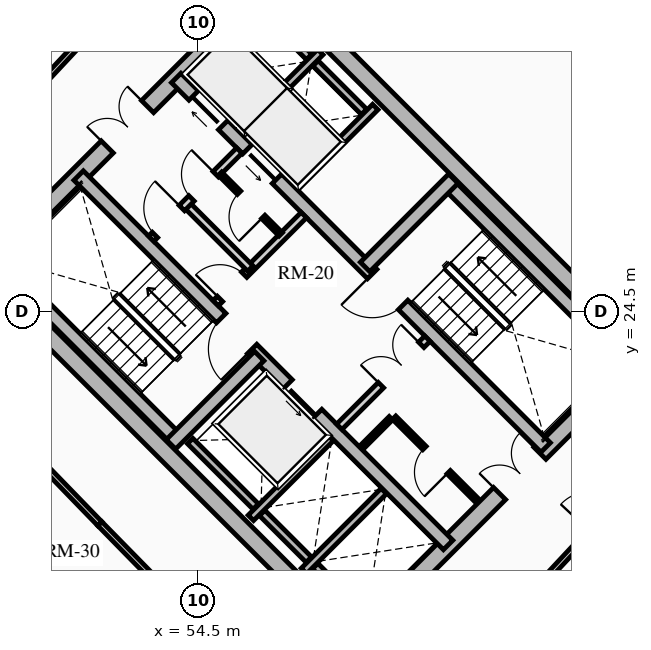
"""IFC4 building model, lengths in metres.
Left out: names, types, materials, properties, quantities, classifications, styles, units other than length and angle.
Written with IfcOpenShell. Run it as: python <this file> out.ifc"""

import sys

from ifc_helpers import new_model, si_unit, direction, frame, frame_2d, origin, place, context, subcontext, project, spatial, rectangle, extrude, source, transform, mapped, element, fill, save


model = new_model("IFC4")
c1 = context("Model", 3, precision=1e-05, world=origin(), true_north=direction((0.0, 1.0)))
c2 = subcontext(c1, "Body", "Model", "MODEL_VIEW")
j1 = project(units=[si_unit("LENGTHUNIT", "METRE"), si_unit("PLANEANGLEUNIT", "RADIAN")], contexts=[c1])
p1 = place(None, origin())
s1 = spatial("IfcSite", under=j1, at=p1, CompositionType="ELEMENT")
p2 = place(p1, origin())
s2 = spatial("IfcBuilding", under=s1, at=p2, CompositionType="ELEMENT")
p3 = place(p2, frame((0.0, 0.0, 105.07)))
s3 = spatial("IfcBuildingStorey", under=s2, at=p3, CompositionType="ELEMENT", Elevation=105.07)
for number, where, z_axis, x_axis in (
    (1, (58.737, 15.697, 0.0), (0.0, 0.0, 1.0), (-0.707, 0.707, 0.0)),
    (2, (66.303, 23.263, 0.0), (0.0, 0.0, 1.0), (-0.707, 0.707, 0.0)),
):
    element("IfcWall", number, at=place(p3, frame(where, z_axis=z_axis, x_axis=x_axis)), inside=s3, PredefinedType="SHEAR", context=c2, shape_type="SweptSolid", body=[
        extrude(rectangle(XDim=14.2, YDim=0.45, at=frame_2d((7.1, 0.0))), origin(), (0.0, 0.0, 1.0), 2.91),
    ])
p4 = place(p3, frame((58.578, 15.856, 0.0), z_axis=(0.0, 0.0, 1.0), x_axis=(0.707106781187, 0.707106781187, 0.0)))
e3 = element("IfcWall", 3, at=p4, inside=s3, PredefinedType="SHEAR", context=c2, shape_type="SweptSolid", body=[
    extrude(rectangle(XDim=10.7, YDim=0.45, at=frame_2d((5.35, 0.0))), origin(), (0.0, 0.0, 1.0), 2.91),
])
m1 = source(origin(), c2, "Body", "SweptSolid", [
    extrude(rectangle(XDim=1.5, YDim=2.02, at=frame_2d((0.75, 1.01))), frame((0.0, 0.235, 0.0), z_axis=(0.0, -1.0, 0.0), x_axis=(1.0, 0.0, 0.0)), (0.0, 0.0, 1.0), 0.47),
])
p5 = place(p4, frame((5.45, 0.0, 0.0)))
e4 = element("IfcOpeningElement", 4, at=p5, cuts=e3, PredefinedType="OPENING", context=c2, shape_type="MappedRepresentation", body=[
    mapped(m1, transform((0.0, 0.0, 0.0), x_axis=(1.0, 0.0, 0.0), y_axis=(0.0, 1.0, 0.0), z_axis=(0.0, 0.0, 1.0), scale=1.0)),
])
p6 = place(p3, frame((48.856, 25.578, 0.0), z_axis=(0.0, 0.0, 1.0), x_axis=(0.707106781187, 0.707106781187, 0.0)))
e5 = element("IfcWall", 5, at=p6, inside=s3, PredefinedType="SHEAR", context=c2, shape_type="SweptSolid", body=[
    extrude(rectangle(XDim=10.7, YDim=0.45, at=frame_2d((5.35, 0.0))), origin(), (0.0, 0.0, 1.0), 2.91),
])
p7 = place(p6, frame((4.6, 0.0, 0.0)))
e6 = element("IfcOpeningElement", 6, at=p7, cuts=e5, PredefinedType="OPENING", context=c2, shape_type="MappedRepresentation", body=[
    mapped(m1, transform((0.0, 0.0, 0.0), x_axis=(1.0, 0.0, 0.0), y_axis=(0.0, 1.0, 0.0), z_axis=(0.0, 0.0, 1.0), scale=1.0)),
])
p8 = place(p3, frame((61.078, 18.355, 0.0), z_axis=(0.0, 0.0, 1.0), x_axis=(-0.707106781187, 0.707106781187, 0.0)))
e7 = element("IfcWall", 7, at=p8, inside=s3, PredefinedType="SHEAR", context=c2, shape_type="SweptSolid", body=[
    extrude(rectangle(XDim=13.75, YDim=0.35, at=frame_2d((6.875, 0.0))), origin(), (0.0, 0.0, 1.0), 2.91),
])
m2 = source(origin(), c2, "Body", "SweptSolid", [
    extrude(rectangle(XDim=1.1, YDim=2.015, at=frame_2d((0.55, 1.007))), frame((0.0, 0.185, 0.0), z_axis=(0.0, -1.0, 0.0), x_axis=(1.0, 0.0, 0.0)), (0.0, 0.0, 1.0), 0.37),
])
p9 = place(p8, frame((4.875, 0.0, 0.0)))
e8 = element("IfcOpeningElement", 8, at=p9, cuts=e7, PredefinedType="OPENING", context=c2, shape_type="MappedRepresentation", body=[
    mapped(m2, transform((0.0, 0.0, 0.0), x_axis=(1.0, 0.0, 0.0), y_axis=(0.0, 1.0, 0.0), z_axis=(0.0, 0.0, 1.0), scale=1.0)),
])
m3 = source(origin(), c2, "Body", "SweptSolid", [
    extrude(rectangle(XDim=1.15, YDim=2.02, at=frame_2d((0.575, 1.01))), frame((0.0, 0.185, 0.0), z_axis=(0.0, -1.0, 0.0), x_axis=(1.0, 0.0, 0.0)), (0.0, 0.0, 1.0), 0.37),
])
p10 = place(p8, frame((7.295, 0.0, 0.0)))
e9 = element("IfcOpeningElement", 9, at=p10, cuts=e7, PredefinedType="OPENING", context=c2, shape_type="MappedRepresentation", body=[
    mapped(m3, transform((0.0, 0.0, 0.0), x_axis=(1.0, 0.0, 0.0), y_axis=(0.0, 1.0, 0.0), z_axis=(0.0, 0.0, 1.0), scale=1.0)),
])
p11 = place(p3, frame((63.645, 20.922, 0.0), z_axis=(0.0, 0.0, 1.0), x_axis=(-0.707106781187, 0.707106781187, 0.0)))
e10 = element("IfcWall", 10, at=p11, inside=s3, PredefinedType="SHEAR", context=c2, shape_type="SweptSolid", body=[
    extrude(rectangle(XDim=13.75, YDim=0.35, at=frame_2d((6.875, 0.0))), origin(), (0.0, 0.0, 1.0), 2.91),
])
p12 = place(p11, frame((10.0, 0.0, 0.0)))
e11 = element("IfcOpeningElement", 11, at=p12, cuts=e10, PredefinedType="OPENING", context=c2, shape_type="MappedRepresentation", body=[
    mapped(m2, transform((0.0, 0.0, 0.0), x_axis=(1.0, 0.0, 0.0), y_axis=(0.0, 1.0, 0.0), z_axis=(0.0, 0.0, 1.0), scale=1.0)),
])
p13 = place(p11, frame((12.0, 0.0, 0.0)))
e12 = element("IfcOpeningElement", 12, at=p13, cuts=e10, PredefinedType="OPENING", context=c2, shape_type="MappedRepresentation", body=[
    mapped(m2, transform((0.0, 0.0, 0.0), x_axis=(1.0, 0.0, 0.0), y_axis=(0.0, 1.0, 0.0), z_axis=(0.0, 0.0, 1.0), scale=1.0)),
])
p14 = place(p11, frame((5.305, 0.0, 0.0)))
e13 = element("IfcOpeningElement", 13, at=p14, cuts=e10, PredefinedType="OPENING", context=c2, shape_type="MappedRepresentation", body=[
    mapped(m3, transform((0.0, 0.0, 0.0), x_axis=(1.0, 0.0, 0.0), y_axis=(0.0, 1.0, 0.0), z_axis=(0.0, 0.0, 1.0), scale=1.0)),
])
p15 = place(p3, frame((53.922, 21.141, 0.0), z_axis=(0.0, 0.0, 1.0), x_axis=(-0.707088616009, 0.707124945897, 0.0)))
e14 = element("IfcWall", 14, at=p15, inside=s3, PredefinedType="SHEAR", context=c2, shape_type="SweptSolid", body=[
    extrude(rectangle(XDim=6.72, YDim=0.35, at=frame_2d((3.36, 0.0))), origin(), (0.0, 0.0, 1.0), 2.91),
])
p16 = place(p3, frame((53.784, 21.003, 0.0), z_axis=(0.0, 0.0, 1.0), x_axis=(0.707106781187, 0.707106781187, 0.0)))
e15 = element("IfcWall", 15, at=p16, inside=s3, PredefinedType="SHEAR", context=c2, shape_type="SweptSolid", body=[
    extrude(rectangle(XDim=3.285, YDim=0.35, at=frame_2d((1.643, 0.0))), origin(), (0.0, 0.0, 1.0), 2.91),
])
p17 = place(p3, frame((65.83, 23.107, 0.0), z_axis=(0.0, 0.0, 1.0), x_axis=(-0.707088616009, 0.707124945897, 0.0)))
e16 = element("IfcWall", 16, at=p17, inside=s3, PredefinedType="SHEAR", context=c2, shape_type="SweptSolid", body=[
    extrude(rectangle(XDim=6.72, YDim=0.35, at=frame_2d((3.36, 0.0))), origin(), (0.0, 0.0, 1.0), 2.91),
])
p18 = place(p3, frame((58.893, 25.674, 0.0), z_axis=(0.0, 0.0, 1.0), x_axis=(0.707106781187, 0.707106781187, 0.0)))
e17 = element("IfcWall", 17, at=p18, inside=s3, PredefinedType="SHEAR", context=c2, shape_type="SweptSolid", body=[
    extrude(rectangle(XDim=3.285, YDim=0.35, at=frame_2d((1.643, 0.0))), origin(), (0.0, 0.0, 1.0), 2.91),
])
p19 = place(p3, frame((55.888, 19.069, 0.0), z_axis=(0.0, 0.0, 1.0), x_axis=(0.707106781187, 0.707106781187, 0.0)))
e18 = element("IfcWall", 18, at=p19, inside=s3, PredefinedType="SHEAR", context=c2, shape_type="SweptSolid", body=[
    extrude(rectangle(XDim=2.97, YDim=0.2, at=frame_2d((1.485, 0.0))), origin(), (0.0, 0.0, 1.0), 2.91),
])
p20 = place(p3, frame((56.015, 19.366, 0.0), z_axis=(0.0, 0.0, 1.0), x_axis=(-0.707106781187, 0.707106781187, 0.0)))
e19 = element("IfcWall", 19, at=p20, inside=s3, PredefinedType="SHEAR", context=c2, shape_type="SweptSolid", body=[
    extrude(rectangle(XDim=2.44, YDim=0.2, at=frame_2d((1.22, 0.0))), origin(), (0.0, 0.0, 1.0), 2.91),
])
p21 = place(p3, frame((57.284, 17.673, 0.0), z_axis=(0.0, 0.0, 1.0), x_axis=(0.707147878904, 0.70706568108, 0.0)))
e20 = element("IfcWall", 20, at=p21, inside=s3, PredefinedType="SHEAR", context=c2, shape_type="SweptSolid", body=[
    extrude(rectangle(XDim=2.97, YDim=0.2, at=frame_2d((1.485, 0.0))), origin(), (0.0, 0.0, 1.0), 2.91),
])
p22 = place(p3, frame((57.412, 17.97, 0.0), z_axis=(0.0, 0.0, 1.0), x_axis=(-0.707106781187, 0.707106781187, 0.0)))
e21 = element("IfcWall", 21, at=p22, inside=s3, PredefinedType="SHEAR", context=c2, shape_type="SweptSolid", body=[
    extrude(rectangle(XDim=1.735, YDim=0.2, at=frame_2d((0.867, 0.0))), origin(), (0.0, 0.0, 1.0), 2.91),
])
p23 = place(p3, frame((58.737, 16.644, 0.0), z_axis=(0.0, 0.0, 1.0), x_axis=(-0.707032117043, 0.707181437447, 0.0)))
e22 = element("IfcWall", 22, at=p23, inside=s3, PredefinedType="SHEAR", context=c2, shape_type="SweptSolid", body=[
    extrude(rectangle(XDim=1.635, YDim=0.2, at=frame_2d((0.817, 0.0))), origin(), (0.0, 0.0, 1.0), 2.91),
])
p24 = place(p3, frame((57.062, 27.781, 0.0), z_axis=(0.0, 0.0, 1.0), x_axis=(0.707106781187, 0.707106781187, 0.0)))
e23 = element("IfcWall", 23, at=p24, inside=s3, PredefinedType="SHEAR", context=c2, shape_type="SweptSolid", body=[
    extrude(rectangle(XDim=2.97, YDim=0.2, at=frame_2d((1.485, 0.0))), origin(), (0.0, 0.0, 1.0), 2.91),
])
p25 = place(p3, frame((55.615, 29.227, 0.0), z_axis=(0.0, 0.0, 1.0), x_axis=(0.707147878904, 0.70706568108, 0.0)))
e24 = element("IfcWall", 24, at=p25, inside=s3, PredefinedType="SHEAR", context=c2, shape_type="SweptSolid", body=[
    extrude(rectangle(XDim=2.97, YDim=0.2, at=frame_2d((1.485, 0.0))), origin(), (0.0, 0.0, 1.0), 2.91),
])
p26 = place(p3, frame((58.865, 29.754, 0.0), z_axis=(0.0, 0.0, 1.0), x_axis=(-0.707174411312, 0.707039144592, 0.0)))
e25 = element("IfcWall", 25, at=p26, inside=s3, PredefinedType="SHEAR", context=c2, shape_type="SweptSolid", body=[
    extrude(rectangle(XDim=1.805, YDim=0.2, at=frame_2d((0.902, 0.0))), origin(), (0.0, 0.0, 1.0), 2.91),
])
p27 = place(p3, frame((57.419, 31.2, 0.0), z_axis=(0.0, 0.0, 1.0), x_axis=(-0.707032117043, 0.707181437447, 0.0)))
e26 = element("IfcWall", 26, at=p27, inside=s3, PredefinedType="SHEAR", context=c2, shape_type="SweptSolid", body=[
    extrude(rectangle(XDim=1.635, YDim=0.2, at=frame_2d((0.817, 0.0))), origin(), (0.0, 0.0, 1.0), 2.91),
])
p28 = place(p3, frame((58.214, 21.467, 0.0), z_axis=(0.0, 0.0, 1.0), x_axis=(0.707106781187, 0.707106781187, 0.0)))
e27 = element("IfcWall", 27, at=p28, inside=s3, PredefinedType="PARTITIONING", context=c2, shape_type="SweptSolid", body=[
    extrude(rectangle(XDim=3.28, YDim=0.2, at=frame_2d((1.64, 0.0))), origin(), (0.0, 0.0, 1.0), 2.655),
])
m4 = source(origin(), c2, "Body", "SweptSolid", [
    extrude(rectangle(XDim=1.5, YDim=2.02, at=frame_2d((0.75, 1.01))), frame((0.0, 0.11, 0.0), z_axis=(0.0, -1.0, 0.0), x_axis=(1.0, 0.0, 0.0)), (0.0, 0.0, 1.0), 0.22),
])
p29 = place(p28, frame((1.55, 0.0, 0.0)))
e28 = element("IfcOpeningElement", 28, at=p29, cuts=e27, PredefinedType="OPENING", context=c2, shape_type="MappedRepresentation", body=[
    mapped(m4, transform((0.0, 0.0, 0.0), x_axis=(1.0, 0.0, 0.0), y_axis=(0.0, 1.0, 0.0), z_axis=(0.0, 0.0, 1.0), scale=1.0)),
])
p30 = place(p3, frame((54.961, 24.719, 0.0), z_axis=(0.0, 0.0, 1.0), x_axis=(0.707106781187, 0.707106781187, 0.0)))
e29 = element("IfcWall", 29, at=p30, inside=s3, PredefinedType="PARTITIONING", context=c2, shape_type="SweptSolid", body=[
    extrude(rectangle(XDim=3.28, YDim=0.2, at=frame_2d((1.64, 0.0))), origin(), (0.0, 0.0, 1.0), 2.655),
])
m5 = source(origin(), c2, "Body", "SweptSolid", [
    extrude(rectangle(XDim=0.9, YDim=2.005, at=frame_2d((0.45, 1.002))), frame((0.0, 0.11, 0.0), z_axis=(0.0, -1.0, 0.0), x_axis=(1.0, 0.0, 0.0)), (0.0, 0.0, 1.0), 0.22),
])
p31 = place(p30, frame((0.16, 0.0, 0.0)))
e30 = element("IfcOpeningElement", 30, at=p31, cuts=e29, PredefinedType="OPENING", context=c2, shape_type="MappedRepresentation", body=[
    mapped(m5, transform((0.0, 0.0, 0.0), x_axis=(1.0, 0.0, 0.0), y_axis=(0.0, 1.0, 0.0), z_axis=(0.0, 0.0, 1.0), scale=1.0)),
])
p32 = place(p3, frame((55.874, 25.631, 0.0), z_axis=(0.0, 0.0, 1.0), x_axis=(-0.707157639372, 0.707055919343, 0.0)))
e31 = element("IfcWall", 31, at=p32, inside=s3, PredefinedType="PARTITIONING", context=c2, shape_type="SweptSolid", body=[
    extrude(rectangle(XDim=2.4, YDim=0.2, at=frame_2d((1.2, 0.0))), origin(), (0.0, 0.0, 1.0), 2.655),
])
p33 = place(p3, frame((53.264, 26.416, 0.0), z_axis=(0.0, 0.0, 1.0), x_axis=(0.707106781187, 0.707106781187, 0.0)))
e32 = element("IfcWall", 32, at=p33, inside=s3, PredefinedType="PARTITIONING", context=c2, shape_type="SweptSolid", body=[
    extrude(rectangle(XDim=3.28, YDim=0.2, at=frame_2d((1.64, 0.0))), origin(), (0.0, 0.0, 1.0), 2.655),
])
m6 = source(origin(), c2, "Body", "SweptSolid", [
    extrude(rectangle(XDim=1.0, YDim=2.015, at=frame_2d((0.5, 1.007))), frame((0.0, 0.11, 0.0), z_axis=(0.0, -1.0, 0.0), x_axis=(1.0, 0.0, 0.0)), (0.0, 0.0, 1.0), 0.22),
])
p34 = place(p33, frame((0.14, 0.0, 0.0)))
e33 = element("IfcOpeningElement", 33, at=p34, cuts=e32, PredefinedType="OPENING", context=c2, shape_type="MappedRepresentation", body=[
    mapped(m6, transform((0.0, 0.0, 0.0), x_axis=(1.0, 0.0, 0.0), y_axis=(0.0, 1.0, 0.0), z_axis=(0.0, 0.0, 1.0), scale=1.0)),
])
p35 = place(p33, frame((1.5, 0.0, 0.0)))
e34 = element("IfcOpeningElement", 34, at=p35, cuts=e32, PredefinedType="OPENING", context=c2, shape_type="MappedRepresentation", body=[
    mapped(m5, transform((0.0, 0.0, 0.0), x_axis=(1.0, 0.0, 0.0), y_axis=(0.0, 1.0, 0.0), z_axis=(0.0, 0.0, 1.0), scale=1.0)),
])
p36 = place(p3, frame((61.835, 19.529, 0.0), z_axis=(0.0, 0.0, 1.0), x_axis=(-0.707146413884, 0.707067146267, 0.0)))
e35 = element("IfcWall", 35, at=p36, inside=s3, PredefinedType="PARTITIONING", context=c2, shape_type="SweptSolid", body=[
    extrude(rectangle(XDim=3.08, YDim=0.125, at=frame_2d((1.54, 0.0))), origin(), (0.0, 0.0, 1.0), 2.655),
])
m7 = source(origin(), c2, "Body", "SweptSolid", [
    extrude(rectangle(XDim=0.9, YDim=2.005, at=frame_2d((0.45, 1.002))), frame((0.0, 0.073, 0.0), z_axis=(0.0, -1.0, 0.0), x_axis=(1.0, 0.0, 0.0)), (0.0, 0.0, 1.0), 0.145),
])
p37 = place(p36, frame((1.05, 0.0, 0.0)))
e36 = element("IfcOpeningElement", 36, at=p37, cuts=e35, PredefinedType="OPENING", context=c2, shape_type="MappedRepresentation", body=[
    mapped(m7, transform((0.0, 0.0, 0.0), x_axis=(1.0, 0.0, 0.0), y_axis=(0.0, 1.0, 0.0), z_axis=(0.0, 0.0, 1.0), scale=1.0)),
])
p38 = place(p3, frame((58.794, 20.915, 0.0), z_axis=(0.0, 0.0, 1.0), x_axis=(0.707106781187, 0.707106781187, 0.0)))
e37 = element("IfcWall", 37, at=p38, inside=s3, PredefinedType="PARTITIONING", context=c2, shape_type="SweptSolid", body=[
    extrude(rectangle(XDim=1.1, YDim=0.125, at=frame_2d((0.55, 0.0))), origin(), (0.0, 0.0, 1.0), 2.655),
])
p39 = place(p3, frame((56.673, 26.529, 0.0), z_axis=(0.0, 0.0, 1.0), x_axis=(-0.707052764397, 0.70716079385, 0.0)))
e38 = element("IfcWall", 38, at=p39, inside=s3, PredefinedType="PARTITIONING", context=c2, shape_type="SweptSolid", body=[
    extrude(rectangle(XDim=2.26, YDim=0.125, at=frame_2d((1.13, 0.0))), origin(), (0.0, 0.0, 1.0), 2.655),
])
p40 = place(p39, frame((0.65, 0.0, 0.0)))
e39 = element("IfcOpeningElement", 39, at=p40, cuts=e38, PredefinedType="OPENING", context=c2, shape_type="MappedRepresentation", body=[
    mapped(m7, transform((0.0, 0.0, 0.0), x_axis=(1.0, 0.0, 0.0), y_axis=(0.0, 1.0, 0.0), z_axis=(0.0, 0.0, 1.0), scale=1.0)),
])
p41 = place(p3, frame((52.043, 32.28, 0.0), z_axis=(0.0, 0.0, 1.0), x_axis=(-0.682606081633, -0.730786519661, 0.0)))
e40 = element("IfcWall", 40, at=p41, inside=s3, PredefinedType="PARTITIONING", context=c2, shape_type="SweptSolid", body=[
    extrude(rectangle(XDim=6.527, YDim=0.15, at=frame_2d((3.263, 0.0))), origin(), (0.0, 0.0, 1.0), 2.225),
])
p42 = place(p3, frame((47.706, 23.253, 0.0), z_axis=(0.0, 0.0, 1.0), x_axis=(0.696179266346, -0.717867974707, 0.0)))
e41 = element("IfcWall", 41, at=p42, inside=s3, PredefinedType="PARTITIONING", context=c2, shape_type="SweptSolid", body=[
    extrude(rectangle(XDim=6.045, YDim=0.15, at=frame_2d((3.022, 0.0))), origin(), (0.0, 0.0, 1.0), 2.655),
])
p43 = place(p3, frame((51.914, 18.914, 0.0), z_axis=(0.0, 0.0, 1.0), x_axis=(0.699999313799, -0.714143515465, 0.0)))
e42 = element("IfcWall", 42, at=p43, inside=s3, PredefinedType="PARTITIONING", context=c2, shape_type="SweptSolid", body=[
    extrude(rectangle(XDim=6.162, YDim=0.15, at=frame_2d((3.081, 0.0))), origin(), (0.0, 0.0, 1.0), 2.225),
])
p44 = place(p3, frame((62.903, 16.667, 0.0), z_axis=(0.0, 0.0, 1.0), x_axis=(0.682371947497, 0.731005147225, 0.0)))
e43 = element("IfcWall", 43, at=p44, inside=s3, PredefinedType="PARTITIONING", context=c2, shape_type="SweptSolid", body=[
    extrude(rectangle(XDim=6.642, YDim=0.15, at=frame_2d((3.321, 0.0))), origin(), (0.0, 0.0, 1.0), 2.225),
])
m8 = source(origin(), c2, "Body", "SweptSolid", [
    extrude(rectangle(XDim=1.05, YDim=2.015, at=frame_2d((0.525, 1.007))), frame((0.0, 0.085, 0.0), z_axis=(0.0, -1.0, 0.0), x_axis=(1.0, 0.0, 0.0)), (0.0, 0.0, 1.0), 0.17),
])
p45 = place(p44, frame((2.796, 0.0, 0.0)))
e44 = element("IfcOpeningElement", 44, at=p45, cuts=e43, PredefinedType="OPENING", context=c2, shape_type="MappedRepresentation", body=[
    mapped(m8, transform((0.0, 0.0, 0.0), x_axis=(1.0, 0.0, 0.0), y_axis=(0.0, 1.0, 0.0), z_axis=(0.0, 0.0, 1.0), scale=1.0)),
])
m9 = source(origin(), c2, "Body", "SweptSolid", [
    extrude(rectangle(XDim=1.1, YDim=2.015, at=frame_2d((0.55, 1.007))), frame((0.0, 0.025, 0.0), z_axis=(0.0, -1.0, 0.0), x_axis=(1.0, 0.0, 0.0)), (0.0, 0.0, 1.0), 0.05),
])
p46 = place(p9, origin())
e45 = element("IfcDoor", 45, at=p46, inside=s3, OperationType="SLIDING_TO_LEFT", PredefinedType="DOOR", context=c2, shape_type="MappedRepresentation", body=[
    mapped(m9, transform((0.0, 0.0, 0.0), x_axis=(1.0, 0.0, 0.0), y_axis=(0.0, 1.0, 0.0), z_axis=(0.0, 0.0, 1.0), scale=1.0)),
])
fill(e8, e45)
p47 = place(p12, origin())
e46 = element("IfcDoor", 46, at=p47, inside=s3, OperationType="SLIDING_TO_LEFT", PredefinedType="DOOR", context=c2, shape_type="MappedRepresentation", body=[
    mapped(m9, transform((0.0, 0.0, 0.0), x_axis=(1.0, 0.0, 0.0), y_axis=(0.0, 1.0, 0.0), z_axis=(0.0, 0.0, 1.0), scale=1.0)),
])
fill(e11, e46)
p48 = place(p13, origin())
e47 = element("IfcDoor", 47, at=p48, inside=s3, OperationType="SLIDING_TO_RIGHT", PredefinedType="DOOR", context=c2, shape_type="MappedRepresentation", body=[
    mapped(m9, transform((0.0, 0.0, 0.0), x_axis=(1.0, 0.0, 0.0), y_axis=(0.0, 1.0, 0.0), z_axis=(0.0, 0.0, 1.0), scale=1.0)),
])
fill(e12, e47)
m10 = source(origin(), c2, "Body", "SweptSolid", [
    extrude(rectangle(XDim=1.15, YDim=2.02, at=frame_2d((0.575, 1.01))), frame((0.0, 0.025, 0.0), z_axis=(0.0, -1.0, 0.0), x_axis=(1.0, 0.0, 0.0)), (0.0, 0.0, 1.0), 0.05),
])
p49 = place(p10, origin())
e48 = element("IfcDoor", 48, at=p49, inside=s3, OperationType="SINGLE_SWING_LEFT", PredefinedType="DOOR", context=c2, shape_type="MappedRepresentation", body=[
    mapped(m10, transform((0.0, 0.0, 0.0), x_axis=(1.0, 0.0, 0.0), y_axis=(0.0, 1.0, 0.0), z_axis=(0.0, 0.0, 1.0), scale=1.0)),
])
fill(e9, e48)
p50 = place(p14, origin())
e49 = element("IfcDoor", 49, at=p50, inside=s3, OperationType="SINGLE_SWING_RIGHT", PredefinedType="DOOR", context=c2, shape_type="MappedRepresentation", body=[
    mapped(m10, transform((0.0, 0.0, 0.0), x_axis=(1.0, 0.0, 0.0), y_axis=(0.0, 1.0, 0.0), z_axis=(0.0, 0.0, 1.0), scale=1.0)),
])
fill(e13, e49)
m11 = source(origin(), c2, "Body", "SweptSolid", [
    extrude(rectangle(XDim=1.5, YDim=2.02, at=frame_2d((0.75, 1.01))), frame((0.0, 0.025, 0.0), z_axis=(0.0, -1.0, 0.0), x_axis=(1.0, 0.0, 0.0)), (0.0, 0.0, 1.0), 0.05),
])
p51 = place(p7, origin())
e50 = element("IfcDoor", 50, at=p51, inside=s3, OperationType="DOUBLE_DOOR_SINGLE_SWING", PredefinedType="DOOR", context=c2, shape_type="MappedRepresentation", body=[
    mapped(m11, transform((0.0, 0.0, 0.0), x_axis=(1.0, 0.0, 0.0), y_axis=(0.0, 1.0, 0.0), z_axis=(0.0, 0.0, 1.0), scale=1.0)),
])
fill(e6, e50)
p52 = place(p5, origin())
e51 = element("IfcDoor", 51, at=p52, inside=s3, OperationType="DOUBLE_DOOR_SINGLE_SWING", PredefinedType="DOOR", context=c2, shape_type="MappedRepresentation", body=[
    mapped(m11, transform((0.0, 0.0, 0.0), x_axis=(1.0, 0.0, 0.0), y_axis=(0.0, 1.0, 0.0), z_axis=(0.0, 0.0, 1.0), scale=1.0)),
])
fill(e4, e51)
p53 = place(p29, origin())
e52 = element("IfcDoor", 52, at=p53, inside=s3, OperationType="DOUBLE_DOOR_SINGLE_SWING", PredefinedType="DOOR", context=c2, shape_type="MappedRepresentation", body=[
    mapped(m11, transform((0.0, 0.0, 0.0), x_axis=(1.0, 0.0, 0.0), y_axis=(0.0, 1.0, 0.0), z_axis=(0.0, 0.0, 1.0), scale=1.0)),
])
fill(e28, e52)
m12 = source(origin(), c2, "Body", "SweptSolid", [
    extrude(rectangle(XDim=0.9, YDim=2.005, at=frame_2d((0.45, 1.002))), frame((0.0, 0.025, 0.0), z_axis=(0.0, -1.0, 0.0), x_axis=(1.0, 0.0, 0.0)), (0.0, 0.0, 1.0), 0.05),
])
p54 = place(p31, origin())
e53 = element("IfcDoor", 53, at=p54, inside=s3, OperationType="SINGLE_SWING_LEFT", PredefinedType="DOOR", context=c2, shape_type="MappedRepresentation", body=[
    mapped(m12, transform((0.0, 0.0, 0.0), x_axis=(1.0, 0.0, 0.0), y_axis=(0.0, 1.0, 0.0), z_axis=(0.0, 0.0, 1.0), scale=1.0)),
])
fill(e30, e53)
m13 = source(origin(), c2, "Body", "SweptSolid", [
    extrude(rectangle(XDim=1.0, YDim=2.015, at=frame_2d((0.5, 1.007))), frame((0.0, 0.025, 0.0), z_axis=(0.0, -1.0, 0.0), x_axis=(1.0, 0.0, 0.0)), (0.0, 0.0, 1.0), 0.05),
])
p55 = place(p34, origin())
e54 = element("IfcDoor", 54, at=p55, inside=s3, OperationType="SINGLE_SWING_RIGHT", PredefinedType="DOOR", context=c2, shape_type="MappedRepresentation", body=[
    mapped(m13, transform((0.0, 0.0, 0.0), x_axis=(1.0, 0.0, 0.0), y_axis=(0.0, 1.0, 0.0), z_axis=(0.0, 0.0, 1.0), scale=1.0)),
])
fill(e33, e54)
p56 = place(p37, origin())
e55 = element("IfcDoor", 55, at=p56, inside=s3, OperationType="SINGLE_SWING_LEFT", PredefinedType="DOOR", context=c2, shape_type="MappedRepresentation", body=[
    mapped(m12, transform((0.0, 0.0, 0.0), x_axis=(1.0, 0.0, 0.0), y_axis=(0.0, 1.0, 0.0), z_axis=(0.0, 0.0, 1.0), scale=1.0)),
])
fill(e36, e55)
p57 = place(p35, origin())
e56 = element("IfcDoor", 56, at=p57, inside=s3, OperationType="SINGLE_SWING_RIGHT", PredefinedType="DOOR", context=c2, shape_type="MappedRepresentation", body=[
    mapped(m12, transform((0.0, 0.0, 0.0), x_axis=(1.0, 0.0, 0.0), y_axis=(0.0, 1.0, 0.0), z_axis=(0.0, 0.0, 1.0), scale=1.0)),
])
fill(e34, e56)
p58 = place(p40, origin())
e57 = element("IfcDoor", 57, at=p58, inside=s3, OperationType="SINGLE_SWING_LEFT", PredefinedType="DOOR", context=c2, shape_type="MappedRepresentation", body=[
    mapped(m12, transform((0.0, 0.0, 0.0), x_axis=(1.0, 0.0, 0.0), y_axis=(0.0, 1.0, 0.0), z_axis=(0.0, 0.0, 1.0), scale=1.0)),
])
fill(e39, e57)
save(model, sys.argv[1])
